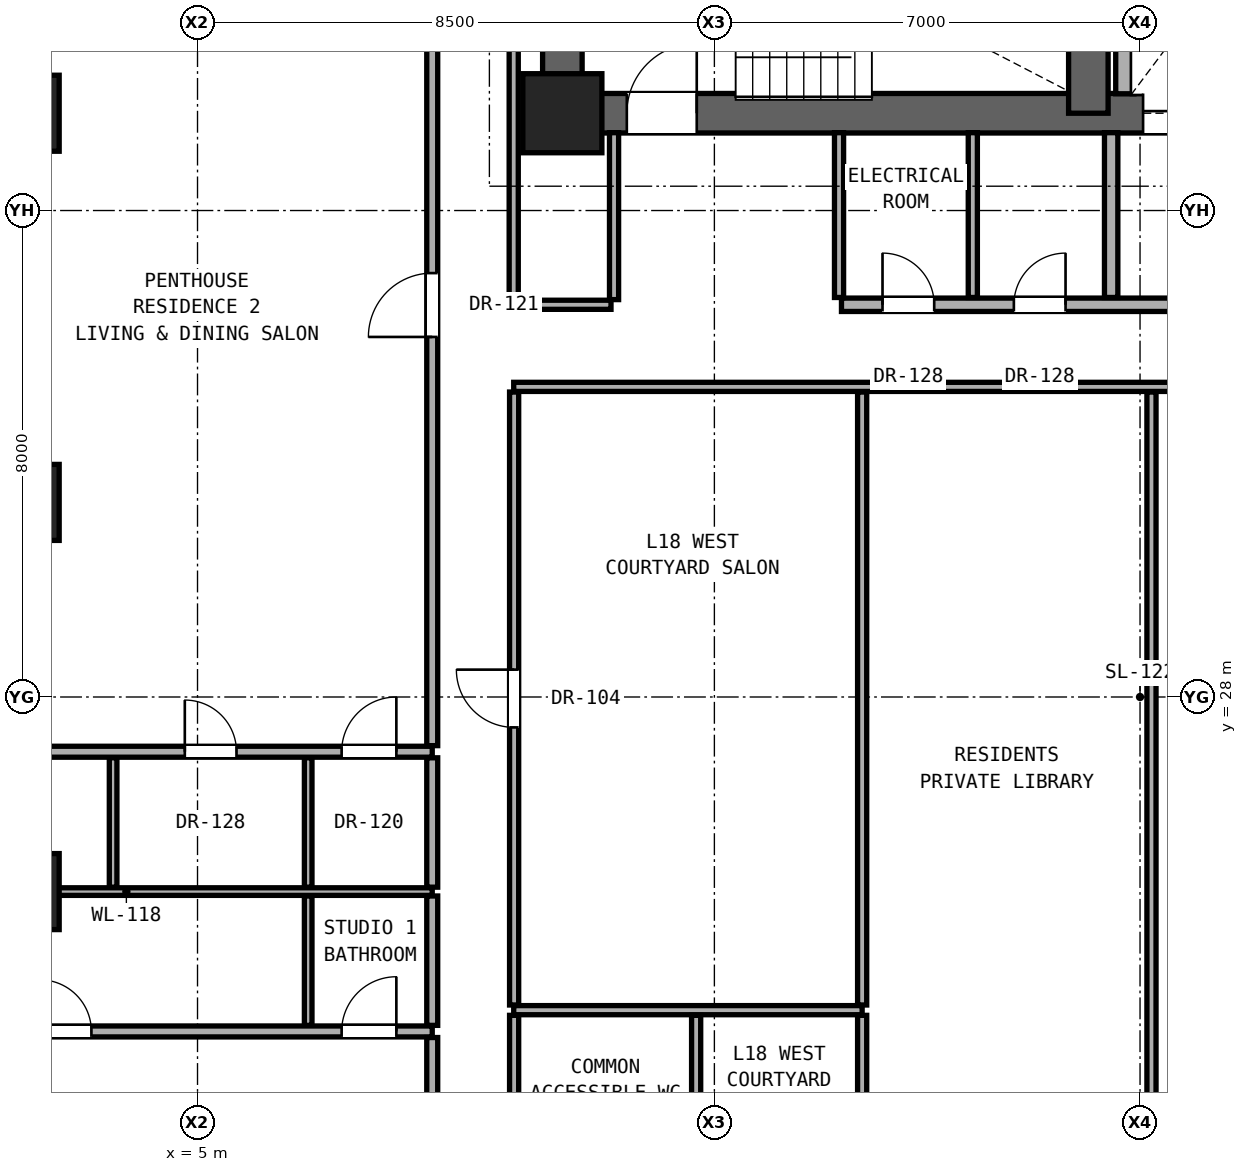
"""IFC4 building model, lengths in metres.
Left out: names, types, materials, properties, quantities, classifications, styles, units other than length and angle.
Written with IfcOpenShell. Run it as: python <this file> out.ifc"""

import sys

from ifc_helpers import new_model, si_unit, direction, frame, frame_2d, origin, origin_2d, place, context, subcontext, project, spatial, rectangle, hollow_rectangle, extrude, element, fill, save


model = new_model("IFC4")
c1 = context("Model", 3, precision=1e-05, world=origin(), true_north=direction((0.0, 1.0)))
c2 = subcontext(c1, "Body", "Model", "MODEL_VIEW")
j1 = project(units=[si_unit("LENGTHUNIT", "METRE"), si_unit("PLANEANGLEUNIT", "RADIAN")], contexts=[c1])
p1 = place(None, origin())
s1 = spatial("IfcSite", under=j1, at=p1, CompositionType="ELEMENT")
p2 = place(p1, origin())
s2 = spatial("IfcBuilding", under=s1, at=p2, CompositionType="ELEMENT")
p3 = place(p2, frame((0.0, 0.0, 65.3)))
s3 = spatial("IfcBuildingStorey", under=s2, at=p3, CompositionType="ELEMENT", Elevation=65.3)
p4 = place(p3, frame((11.0, 37.6, 0.0), z_axis=(0.0, 0.0, 1.0), x_axis=(1.0, 0.0, 0.0)))
e1 = element("IfcColumn", 1, at=p4, inside=s3, PredefinedType="COLUMN", context=c2, shape_type="SweptSolid", body=[
    extrude(rectangle(XDim=1.3, YDim=1.3, at=origin_2d()), origin(), (0.0, 0.0, 1.0), 3.3),
])
for number, where, z_axis, x_axis in (
    (2, (2.1, 24.8, 0.0), (0.0, 0.0, 1.0), (1.0, 0.0, 0.0)),
    (3, (2.1, 31.2, 0.0), (0.0, 0.0, 1.0), (1.0, 0.0, 0.0)),
    (4, (2.1, 37.6, 0.0), (0.0, 0.0, 1.0), (1.0, 0.0, 0.0)),
):
    element("IfcColumn", number, at=place(p3, frame(where, z_axis=z_axis, x_axis=x_axis)), inside=s3, PredefinedType="COLUMN", context=c2, shape_type="SweptSolid", body=[
        extrude(hollow_rectangle(XDim=1.25, YDim=1.25, WallThickness=0.07, at=origin_2d()), origin(), (0.0, 0.0, 1.0), 3.3),
    ])
p5 = place(p3, frame((11.0, 37.6, 0.0), z_axis=(0.0, 0.0, 1.0), x_axis=(0.0, 1.0, 0.0)))
e5 = element("IfcWall", 5, at=p5, inside=s3, PredefinedType="SHEAR", context=c2, shape_type="SweptSolid", body=[
    extrude(rectangle(XDim=6.0, YDim=0.65, at=frame_2d((3.0, 0.0))), origin(), (0.0, 0.0, 1.0), 3.06),
])
p6 = place(p3, frame((11.0, 37.6, 0.0), z_axis=(0.0, 0.0, 1.0), x_axis=(1.0, 0.0, 0.0)))
e6 = element("IfcWall", 6, at=p6, inside=s3, PredefinedType="SHEAR", context=c2, shape_type="SweptSolid", body=[
    extrude(rectangle(XDim=19.0, YDim=0.65, at=frame_2d((9.5, 0.0))), origin(), (0.0, 0.0, 1.0), 3.06),
])
p7 = place(p6, frame((1.06, 0.0, 0.0)))
e7 = element("IfcOpeningElement", 7, at=p7, cuts=e6, PredefinedType="OPENING", context=c2, shape_type="SweptSolid", body=[
    extrude(rectangle(XDim=1.15, YDim=2.2, at=frame_2d((0.575, 1.1))), frame((0.0, 0.335, 0.0), z_axis=(0.0, -1.0, 0.0), x_axis=(1.0, 0.0, 0.0)), (0.0, 0.0, 1.0), 0.67),
])
p8 = place(p6, frame((9.55, 0.0, 0.0)))
e8 = element("IfcOpeningElement", 8, at=p8, cuts=e6, PredefinedType="OPENING", context=c2, shape_type="SweptSolid", body=[
    extrude(rectangle(XDim=1.4, YDim=2.35, at=frame_2d((0.7, 1.175))), frame((0.0, 0.335, 0.0), z_axis=(0.0, -1.0, 0.0), x_axis=(1.0, 0.0, 0.0)), (0.0, 0.0, 1.0), 0.67),
])
p9 = place(p6, frame((11.95, 0.0, 0.0)))
e9 = element("IfcOpeningElement", 9, at=p9, cuts=e6, PredefinedType="OPENING", context=c2, shape_type="SweptSolid", body=[
    extrude(rectangle(XDim=1.4, YDim=2.35, at=frame_2d((0.7, 1.175))), frame((0.0, 0.335, 0.0), z_axis=(0.0, -1.0, 0.0), x_axis=(1.0, 0.0, 0.0)), (0.0, 0.0, 1.0), 0.67),
])
p10 = place(p6, frame((14.4, 0.0, 0.0)))
e10 = element("IfcOpeningElement", 10, at=p10, cuts=e6, PredefinedType="OPENING", context=c2, shape_type="SweptSolid", body=[
    extrude(rectangle(XDim=1.3, YDim=2.3, at=frame_2d((0.65, 1.15))), frame((0.0, 0.335, 0.0), z_axis=(0.0, -1.0, 0.0), x_axis=(1.0, 0.0, 0.0)), (0.0, 0.0, 1.0), 0.67),
])
p11 = place(p6, frame((16.6, 0.0, 0.0)))
e11 = element("IfcOpeningElement", 11, at=p11, cuts=e6, PredefinedType="OPENING", context=c2, shape_type="SweptSolid", body=[
    extrude(rectangle(XDim=1.3, YDim=2.3, at=frame_2d((0.65, 1.15))), frame((0.0, 0.335, 0.0), z_axis=(0.0, -1.0, 0.0), x_axis=(1.0, 0.0, 0.0)), (0.0, 0.0, 1.0), 0.67),
])
p12 = place(p3, frame((19.65, 37.6, 0.0), z_axis=(0.0, 0.0, 1.0), x_axis=(0.0, 1.0, 0.0)))
e12 = element("IfcWall", 12, at=p12, inside=s3, PredefinedType="SHEAR", context=c2, shape_type="SweptSolid", body=[
    extrude(rectangle(XDim=3.493, YDim=0.65, at=frame_2d((1.747, 0.0))), origin(), (0.0, 0.0, 1.0), 3.06),
])
p13 = place(p3, frame((-1.2, 22.5, 0.0), z_axis=(0.0, 0.0, 1.0), x_axis=(1.0, 0.0, 0.0)))
e13 = element("IfcWall", 13, at=p13, inside=s3, PredefinedType="PARTITIONING", context=c2, shape_type="SweptSolid", body=[
    extrude(rectangle(XDim=10.06, YDim=0.18, at=frame_2d((5.03, 0.0))), origin(), (0.0, 0.0, 1.0), 2.125),
])
p14 = place(p13, frame((3.605, 0.0, 0.0)))
e14 = element("IfcOpeningElement", 14, at=p14, cuts=e13, PredefinedType="OPENING", context=c2, shape_type="SweptSolid", body=[
    extrude(rectangle(XDim=0.85, YDim=2.01, at=frame_2d((0.425, 1.005))), frame((0.0, 0.1, 0.0), z_axis=(0.0, -1.0, 0.0), x_axis=(1.0, 0.0, 0.0)), (0.0, 0.0, 1.0), 0.2),
])
p15 = place(p13, frame((8.57, 0.0, 0.0)))
e15 = element("IfcOpeningElement", 15, at=p15, cuts=e13, PredefinedType="OPENING", context=c2, shape_type="SweptSolid", body=[
    extrude(rectangle(XDim=0.9, YDim=2.1, at=frame_2d((0.45, 1.05))), frame((0.0, 0.1, 0.0), z_axis=(0.0, -1.0, 0.0), x_axis=(1.0, 0.0, 0.0)), (0.0, 0.0, 1.0), 0.2),
])
p16 = place(p3, frame((10.2, 22.85, 0.0), z_axis=(0.0, 0.0, 1.0), x_axis=(1.0, 0.0, 0.0)))
e16 = element("IfcWall", 16, at=p16, inside=s3, PredefinedType="PARTITIONING", context=c2, shape_type="SweptSolid", body=[
    extrude(rectangle(XDim=5.73, YDim=0.15, at=frame_2d((2.865, 0.0))), origin(), (0.0, 0.0, 1.0), 2.104),
])
p17 = place(p3, frame((-1.2, 24.8, 0.0), z_axis=(0.0, 0.0, 1.0), x_axis=(1.0, 0.0, 0.0)))
e17 = element("IfcWall", 17, at=p17, inside=s3, PredefinedType="PARTITIONING", context=c2, shape_type="SweptSolid", body=[
    extrude(rectangle(XDim=10.06, YDim=0.125, at=frame_2d((5.03, 0.0))), origin(), (0.0, 0.0, 1.0), 2.125),
])
p18 = place(p3, frame((-1.2, 27.1, 0.0), z_axis=(0.0, 0.0, 1.0), x_axis=(1.0, 0.0, 0.0)))
e18 = element("IfcWall", 18, at=p18, inside=s3, PredefinedType="PARTITIONING", context=c2, shape_type="SweptSolid", body=[
    extrude(rectangle(XDim=10.06, YDim=0.18, at=frame_2d((5.03, 0.0))), origin(), (0.0, 0.0, 1.0), 2.125),
])
p19 = place(p18, frame((2.001, 0.0, 0.0)))
e19 = element("IfcOpeningElement", 19, at=p19, cuts=e18, PredefinedType="OPENING", context=c2, shape_type="SweptSolid", body=[
    extrude(rectangle(XDim=0.85, YDim=2.01, at=frame_2d((0.425, 1.005))), frame((0.0, 0.1, 0.0), z_axis=(0.0, -1.0, 0.0), x_axis=(1.0, 0.0, 0.0)), (0.0, 0.0, 1.0), 0.2),
])
p20 = place(p18, frame((5.991, 0.0, 0.0)))
e20 = element("IfcOpeningElement", 20, at=p20, cuts=e18, PredefinedType="OPENING", context=c2, shape_type="SweptSolid", body=[
    extrude(rectangle(XDim=0.85, YDim=2.01, at=frame_2d((0.425, 1.005))), frame((0.0, 0.1, 0.0), z_axis=(0.0, -1.0, 0.0), x_axis=(1.0, 0.0, 0.0)), (0.0, 0.0, 1.0), 0.2),
])
p21 = place(p18, frame((8.57, 0.0, 0.0)))
e21 = element("IfcOpeningElement", 21, at=p21, cuts=e18, PredefinedType="OPENING", context=c2, shape_type="SweptSolid", body=[
    extrude(rectangle(XDim=0.9, YDim=2.1, at=frame_2d((0.45, 1.05))), frame((0.0, 0.1, 0.0), z_axis=(0.0, -1.0, 0.0), x_axis=(1.0, 0.0, 0.0)), (0.0, 0.0, 1.0), 0.2),
])
p22 = place(p3, frame((10.2, 33.1, 0.0), z_axis=(0.0, 0.0, 1.0), x_axis=(1.0, 0.0, 0.0)))
e22 = element("IfcWall", 22, at=p22, inside=s3, PredefinedType="PARTITIONING", context=c2, shape_type="SweptSolid", body=[
    extrude(rectangle(XDim=20.6, YDim=0.15, at=frame_2d((10.3, 0.0))), origin(), (0.0, 0.0, 1.0), 2.104),
])
p23 = place(p22, frame((12.666, 0.0, 0.0)))
e23 = element("IfcOpeningElement", 23, at=p23, cuts=e22, PredefinedType="OPENING", context=c2, shape_type="SweptSolid", body=[
    extrude(rectangle(XDim=0.85, YDim=2.01, at=frame_2d((0.425, 1.005))), frame((0.0, 0.085, 0.0), z_axis=(0.0, -1.0, 0.0), x_axis=(1.0, 0.0, 0.0)), (0.0, 0.0, 1.0), 0.17),
])
p24 = place(p22, frame((17.701, 0.0, 0.0)))
e24 = element("IfcOpeningElement", 24, at=p24, cuts=e22, PredefinedType="OPENING", context=c2, shape_type="SweptSolid", body=[
    extrude(rectangle(XDim=0.85, YDim=2.01, at=frame_2d((0.425, 1.005))), frame((0.0, 0.085, 0.0), z_axis=(0.0, -1.0, 0.0), x_axis=(1.0, 0.0, 0.0)), (0.0, 0.0, 1.0), 0.17),
])
p25 = place(p3, frame((10.2, 34.45, 0.0), z_axis=(0.0, 0.0, 1.0), x_axis=(1.0, 0.0, 0.0)))
e25 = element("IfcWall", 25, at=p25, inside=s3, PredefinedType="PARTITIONING", context=c2, shape_type="SweptSolid", body=[
    extrude(rectangle(XDim=1.6, YDim=0.15, at=frame_2d((0.8, 0.0))), origin(), (0.0, 0.0, 1.0), 2.104),
])
p26 = place(p3, frame((15.59, 34.45, 0.0), z_axis=(0.0, 0.0, 1.0), x_axis=(1.0, 0.0, 0.0)))
e26 = element("IfcWall", 26, at=p26, inside=s3, PredefinedType="SOLIDWALL", context=c2, shape_type="SweptSolid", body=[
    extrude(rectangle(XDim=15.21, YDim=0.22, at=frame_2d((7.605, 0.0))), origin(), (0.0, 0.0, 1.0), 2.104),
])
p27 = place(p26, frame((6.435, 0.0, 0.0)))
e27 = element("IfcOpeningElement", 27, at=p27, cuts=e26, PredefinedType="OPENING", context=c2, shape_type="SweptSolid", body=[
    extrude(rectangle(XDim=0.85, YDim=2.01, at=frame_2d((0.425, 1.005))), frame((0.0, 0.12, 0.0), z_axis=(0.0, -1.0, 0.0), x_axis=(1.0, 0.0, 0.0)), (0.0, 0.0, 1.0), 0.24),
])
p28 = place(p26, frame((11.135, 0.0, 0.0)))
e28 = element("IfcOpeningElement", 28, at=p28, cuts=e26, PredefinedType="OPENING", context=c2, shape_type="SweptSolid", body=[
    extrude(rectangle(XDim=0.85, YDim=2.01, at=frame_2d((0.425, 1.005))), frame((0.0, 0.12, 0.0), z_axis=(0.0, -1.0, 0.0), x_axis=(1.0, 0.0, 0.0)), (0.0, 0.0, 1.0), 0.24),
])
p29 = place(p26, frame((0.675, 0.0, 0.0)))
e29 = element("IfcOpeningElement", 29, at=p29, cuts=e26, PredefinedType="OPENING", context=c2, shape_type="SweptSolid", body=[
    extrude(rectangle(XDim=0.85, YDim=2.01, at=frame_2d((0.425, 1.005))), frame((0.0, 0.12, 0.0), z_axis=(0.0, -1.0, 0.0), x_axis=(1.0, 0.0, 0.0)), (0.0, 0.0, 1.0), 0.24),
])
p30 = place(p26, frame((2.835, 0.0, 0.0)))
e30 = element("IfcOpeningElement", 30, at=p30, cuts=e26, PredefinedType="OPENING", context=c2, shape_type="SweptSolid", body=[
    extrude(rectangle(XDim=0.85, YDim=2.01, at=frame_2d((0.425, 1.005))), frame((0.0, 0.12, 0.0), z_axis=(0.0, -1.0, 0.0), x_axis=(1.0, 0.0, 0.0)), (0.0, 0.0, 1.0), 0.24),
])
for number, where, z_axis, x_axis in (
    (31, (3.612, 24.873, 0.0), (0.0, 0.0, 1.0), (0.0, 1.0, 0.0)),
    (32, (6.82, 22.6, 0.0), (0.0, 0.0, 1.0), (0.0, 1.0, 0.0)),
    (33, (6.82, 24.873, 0.0), (0.0, 0.0, 1.0), (0.0, 1.0, 0.0)),
):
    element("IfcWall", number, at=place(p3, frame(where, z_axis=z_axis, x_axis=x_axis)), inside=s3, PredefinedType="PARTITIONING", context=c2, shape_type="SweptSolid", body=[
        extrude(rectangle(XDim=2.127, YDim=0.125, at=frame_2d((1.064, 0.0))), origin(), (0.0, 0.0, 1.0), 2.279),
    ])
p31 = place(p3, frame((8.86, 14.308, 0.0), z_axis=(0.0, 0.0, 1.0), x_axis=(0.0, 1.0, 0.0)))
e34 = element("IfcWall", 34, at=p31, inside=s3, PredefinedType="PARTITIONING", context=c2, shape_type="SweptSolid", body=[
    extrude(rectangle(XDim=8.092, YDim=0.18, at=frame_2d((4.046, 0.0))), origin(), (0.0, 0.0, 1.0), 2.436),
])
p32 = place(p31, frame((3.521, 0.0, 0.0)))
e35 = element("IfcOpeningElement", 35, at=p32, cuts=e34, PredefinedType="OPENING", context=c2, shape_type="SweptSolid", body=[
    extrude(rectangle(XDim=1.05, YDim=2.2, at=frame_2d((0.525, 1.1))), frame((0.0, 0.1, 0.0), z_axis=(0.0, -1.0, 0.0), x_axis=(1.0, 0.0, 0.0)), (0.0, 0.0, 1.0), 0.2),
])
for number, where, z_axis, x_axis in (
    (36, (8.86, 22.6, 0.0), (0.0, 0.0, 1.0), (0.0, 1.0, 0.0)),
    (37, (8.86, 24.873, 0.0), (0.0, 0.0, 1.0), (0.0, 1.0, 0.0)),
):
    element("IfcWall", number, at=place(p3, frame(where, z_axis=z_axis, x_axis=x_axis)), inside=s3, PredefinedType="PARTITIONING", context=c2, shape_type="SweptSolid", body=[
        extrude(rectangle(XDim=2.127, YDim=0.18, at=frame_2d((1.064, 0.0))), origin(), (0.0, 0.0, 1.0), 2.279),
    ])
p33 = place(p3, frame((8.86, 27.2, 0.0), z_axis=(0.0, 0.0, 1.0), x_axis=(0.0, 1.0, 0.0)))
e38 = element("IfcWall", 38, at=p33, inside=s3, PredefinedType="PARTITIONING", context=c2, shape_type="SweptSolid", body=[
    extrude(rectangle(XDim=14.492, YDim=0.18, at=frame_2d((7.246, 0.0))), origin(), (0.0, 0.0, 1.0), 2.279),
])
p34 = place(p33, frame((6.721, 0.0, 0.0)))
e39 = element("IfcOpeningElement", 39, at=p34, cuts=e38, PredefinedType="OPENING", context=c2, shape_type="SweptSolid", body=[
    extrude(rectangle(XDim=1.05, YDim=2.2, at=frame_2d((0.525, 1.1))), frame((0.0, 0.1, 0.0), z_axis=(0.0, -1.0, 0.0), x_axis=(1.0, 0.0, 0.0)), (0.0, 0.0, 1.0), 0.2),
])
p35 = place(p3, frame((10.207, 19.985, 0.0), z_axis=(0.0, 0.0, 1.0), x_axis=(0.0, 1.0, 0.0)))
e40 = element("IfcWall", 40, at=p35, inside=s3, PredefinedType="PARTITIONING", context=c2, shape_type="SweptSolid", body=[
    extrude(rectangle(XDim=2.78, YDim=0.15, at=frame_2d((1.39, 0.0))), origin(), (0.0, 0.0, 1.0), 3.06),
])
p36 = place(p3, frame((10.207, 22.935, 0.0), z_axis=(0.0, 0.0, 1.0), x_axis=(0.0, 1.0, 0.0)))
e41 = element("IfcWall", 41, at=p36, inside=s3, PredefinedType="PARTITIONING", context=c2, shape_type="SweptSolid", body=[
    extrude(rectangle(XDim=10.08, YDim=0.15, at=frame_2d((5.04, 0.0))), origin(), (0.0, 0.0, 1.0), 2.279),
])
p37 = place(p36, frame((4.565, 0.0, 0.0)))
e42 = element("IfcOpeningElement", 42, at=p37, cuts=e41, PredefinedType="OPENING", context=c2, shape_type="SweptSolid", body=[
    extrude(rectangle(XDim=0.95, YDim=2.15, at=frame_2d((0.475, 1.075))), frame((0.0, 0.085, 0.0), z_axis=(0.0, -1.0, 0.0), x_axis=(1.0, 0.0, 0.0)), (0.0, 0.0, 1.0), 0.17),
])
p38 = place(p3, frame((10.2, 34.535, 0.0), z_axis=(0.0, 0.0, 1.0), x_axis=(0.0, 1.0, 0.0)))
e43 = element("IfcWall", 43, at=p38, inside=s3, PredefinedType="PARTITIONING", context=c2, shape_type="SweptSolid", body=[
    extrude(rectangle(XDim=9.13, YDim=0.15, at=frame_2d((4.565, 0.0))), origin(), (0.0, 0.0, 1.0), 2.436),
])
p39 = place(p3, frame((11.85, 34.535, 0.0), z_axis=(0.0, 0.0, 1.0), x_axis=(0.0, 1.0, 0.0)))
e44 = element("IfcWall", 44, at=p39, inside=s3, PredefinedType="PARTITIONING", context=c2, shape_type="SweptSolid", body=[
    extrude(rectangle(XDim=2.745, YDim=0.15, at=frame_2d((1.373, 0.0))), origin(), (0.0, 0.0, 1.0), 3.06),
])
p40 = place(p3, frame((13.2, 19.985, 0.0), z_axis=(0.0, 0.0, 1.0), x_axis=(0.0, 1.0, 0.0)))
e45 = element("IfcWall", 45, at=p40, inside=s3, PredefinedType="PARTITIONING", context=c2, shape_type="SweptSolid", body=[
    extrude(rectangle(XDim=2.78, YDim=0.15, at=frame_2d((1.39, 0.0))), origin(), (0.0, 0.0, 1.0), 3.06),
])
p41 = place(p3, frame((15.55, 34.57, 0.0), z_axis=(0.0, 0.0, 1.0), x_axis=(0.0, 1.0, 0.0)))
e46 = element("IfcWall", 46, at=p41, inside=s3, PredefinedType="PARTITIONING", context=c2, shape_type="SweptSolid", body=[
    extrude(rectangle(XDim=2.71, YDim=0.15, at=frame_2d((1.355, 0.0))), origin(), (0.0, 0.0, 1.0), 2.589),
])
p42 = place(p3, frame((15.93, 19.985, 0.0), z_axis=(0.0, 0.0, 1.0), x_axis=(0.0, 1.0, 0.0)))
e47 = element("IfcWall", 47, at=p42, inside=s3, PredefinedType="PARTITIONING", context=c2, shape_type="SweptSolid", body=[
    extrude(rectangle(XDim=2.78, YDim=0.15, at=frame_2d((1.39, 0.0))), origin(), (0.0, 0.0, 1.0), 2.589),
])
p43 = place(p3, frame((15.93, 22.935, 0.0), z_axis=(0.0, 0.0, 1.0), x_axis=(0.0, 1.0, 0.0)))
e48 = element("IfcWall", 48, at=p43, inside=s3, PredefinedType="PARTITIONING", context=c2, shape_type="SweptSolid", body=[
    extrude(rectangle(XDim=10.08, YDim=0.15, at=frame_2d((5.04, 0.0))), origin(), (0.0, 0.0, 1.0), 2.104),
])
p44 = place(p3, frame((17.75, 34.57, 0.0), z_axis=(0.0, 0.0, 1.0), x_axis=(0.0, 1.0, 0.0)))
e49 = element("IfcWall", 49, at=p44, inside=s3, PredefinedType="PARTITIONING", context=c2, shape_type="SweptSolid", body=[
    extrude(rectangle(XDim=2.71, YDim=0.15, at=frame_2d((1.355, 0.0))), origin(), (0.0, 0.0, 1.0), 3.06),
])
p45 = place(p3, frame((20.025, 34.57, 0.0), z_axis=(0.0, 0.0, 1.0), x_axis=(0.0, 1.0, 0.0)))
e50 = element("IfcWall", 50, at=p45, inside=s3, PredefinedType="SOLIDWALL", context=c2, shape_type="SweptSolid", body=[
    extrude(rectangle(XDim=2.71, YDim=0.22, at=frame_2d((1.355, 0.0))), origin(), (0.0, 0.0, 1.0), 3.06),
])
p46 = place(p3, frame((20.25, 37.92, 0.0), z_axis=(0.0, 0.0, 1.0), x_axis=(0.0, 1.0, 0.0)))
e51 = element("IfcWall", 51, at=p46, inside=s3, PredefinedType="SOLIDWALL", context=c2, shape_type="SweptSolid", body=[
    extrude(rectangle(XDim=2.32, YDim=0.3, at=frame_2d((1.16, 0.0))), origin(), (0.0, 0.0, 1.0), 3.06),
])
p47 = place(p3, frame((20.688, 19.985, 0.0), z_axis=(0.0, 0.0, 1.0), x_axis=(0.0, 1.0, 0.0)))
e52 = element("IfcWall", 52, at=p47, inside=s3, PredefinedType="PARTITIONING", context=c2, shape_type="SweptSolid", body=[
    extrude(rectangle(XDim=13.03, YDim=0.15, at=frame_2d((6.515, 0.0))), origin(), (0.0, 0.0, 1.0), 2.104),
])
p48 = place(p7, origin())
e53 = element("IfcDoor", 53, at=p48, inside=s3, OperationType="SINGLE_SWING_RIGHT", PredefinedType="DOOR", context=c2, shape_type="SweptSolid", body=[
    extrude(rectangle(XDim=1.15, YDim=2.2, at=frame_2d((0.575, 1.1))), frame((0.0, 0.025, 0.0), z_axis=(0.0, -1.0, 0.0), x_axis=(1.0, 0.0, 0.0)), (0.0, 0.0, 1.0), 0.05),
])
fill(e7, e53)
p49 = place(p29, origin())
e54 = element("IfcDoor", 54, at=p49, inside=s3, OperationType="SINGLE_SWING_LEFT", PredefinedType="DOOR", context=c2, shape_type="SweptSolid", body=[
    extrude(rectangle(XDim=0.85, YDim=2.01, at=frame_2d((0.425, 1.005))), frame((0.0, 0.025, 0.0), z_axis=(0.0, -1.0, 0.0), x_axis=(1.0, 0.0, 0.0)), (0.0, 0.0, 1.0), 0.05),
])
fill(e29, e54)
p50 = place(p30, origin())
e55 = element("IfcDoor", 55, at=p50, inside=s3, OperationType="SINGLE_SWING_RIGHT", PredefinedType="DOOR", context=c2, shape_type="SweptSolid", body=[
    extrude(rectangle(XDim=0.85, YDim=2.01, at=frame_2d((0.425, 1.005))), frame((0.0, 0.025, 0.0), z_axis=(0.0, -1.0, 0.0), x_axis=(1.0, 0.0, 0.0)), (0.0, 0.0, 1.0), 0.05),
])
fill(e30, e55)
p51 = place(p14, origin())
e56 = element("IfcDoor", 56, at=p51, inside=s3, OperationType="SINGLE_SWING_LEFT", PredefinedType="DOOR", context=c2, shape_type="SweptSolid", body=[
    extrude(rectangle(XDim=0.85, YDim=2.01, at=frame_2d((0.425, 1.005))), frame((0.0, 0.025, 0.0), z_axis=(0.0, -1.0, 0.0), x_axis=(1.0, 0.0, 0.0)), (0.0, 0.0, 1.0), 0.05),
])
fill(e14, e56)
p52 = place(p15, origin())
e57 = element("IfcDoor", 57, at=p52, inside=s3, OperationType="SINGLE_SWING_RIGHT", PredefinedType="DOOR", context=c2, shape_type="SweptSolid", body=[
    extrude(rectangle(XDim=0.9, YDim=2.1, at=frame_2d((0.45, 1.05))), frame((0.0, 0.025, 0.0), z_axis=(0.0, -1.0, 0.0), x_axis=(1.0, 0.0, 0.0)), (0.0, 0.0, 1.0), 0.05),
])
fill(e15, e57)
p53 = place(p34, origin())
e58 = element("IfcDoor", 58, at=p53, inside=s3, OperationType="SINGLE_SWING_LEFT", PredefinedType="DOOR", context=c2, shape_type="SweptSolid", body=[
    extrude(rectangle(XDim=1.05, YDim=2.2, at=frame_2d((0.525, 1.1))), frame((0.0, 0.025, 0.0), z_axis=(0.0, -1.0, 0.0), x_axis=(1.0, 0.0, 0.0)), (0.0, 0.0, 1.0), 0.05),
])
fill(e39, e58)
p54 = place(p20, origin())
e59 = element("IfcDoor", 59, at=p54, inside=s3, OperationType="SINGLE_SWING_LEFT", PredefinedType="DOOR", context=c2, shape_type="SweptSolid", body=[
    extrude(rectangle(XDim=0.85, YDim=2.01, at=frame_2d((0.425, 1.005))), frame((0.0, 0.025, 0.0), z_axis=(0.0, -1.0, 0.0), x_axis=(1.0, 0.0, 0.0)), (0.0, 0.0, 1.0), 0.05),
])
fill(e20, e59)
p55 = place(p21, origin())
e60 = element("IfcDoor", 60, at=p55, inside=s3, OperationType="SINGLE_SWING_RIGHT", PredefinedType="DOOR", context=c2, shape_type="SweptSolid", body=[
    extrude(rectangle(XDim=0.9, YDim=2.1, at=frame_2d((0.45, 1.05))), frame((0.0, 0.025, 0.0), z_axis=(0.0, -1.0, 0.0), x_axis=(1.0, 0.0, 0.0)), (0.0, 0.0, 1.0), 0.05),
])
fill(e21, e60)
p56 = place(p37, origin())
e61 = element("IfcDoor", 61, at=p56, inside=s3, OperationType="SINGLE_SWING_RIGHT", PredefinedType="DOOR", context=c2, shape_type="SweptSolid", body=[
    extrude(rectangle(XDim=0.95, YDim=2.15, at=frame_2d((0.475, 1.075))), frame((0.0, 0.025, 0.0), z_axis=(0.0, -1.0, 0.0), x_axis=(1.0, 0.0, 0.0)), (0.0, 0.0, 1.0), 0.05),
])
fill(e42, e61)
p57 = place(p8, origin())
e62 = element("IfcDoor", 62, at=p57, inside=s3, OperationType="DOUBLE_DOOR_SLIDING", PredefinedType="DOOR", context=c2, shape_type="SweptSolid", body=[
    extrude(rectangle(XDim=1.4, YDim=2.35, at=frame_2d((0.7, 1.175))), frame((0.0, 0.025, 0.0), z_axis=(0.0, -1.0, 0.0), x_axis=(1.0, 0.0, 0.0)), (0.0, 0.0, 1.0), 0.05),
])
fill(e8, e62)
save(model, sys.argv[1])
